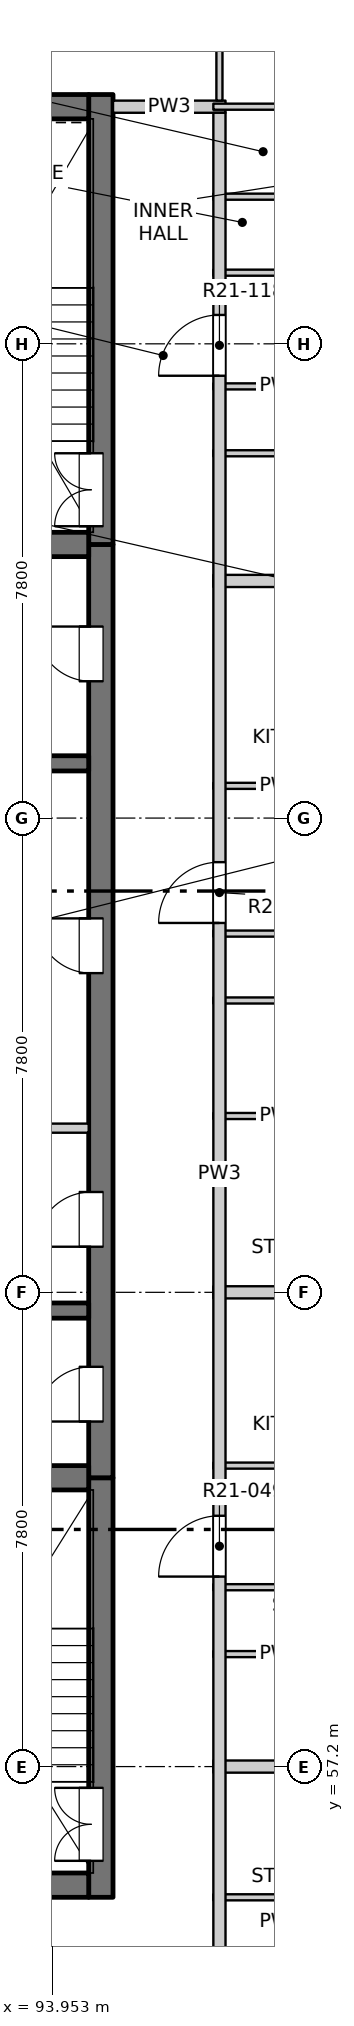
"""IFC4 building model, lengths in metres.
Left out: names, types, materials, properties, quantities, classifications, styles, units other than length and angle.
Written with IfcOpenShell. Run it as: python <this file> out.ifc"""

import sys

from ifc_helpers import new_model, si_unit, direction, frame, frame_2d, origin, place, context, subcontext, project, spatial, rectangle, extrude, element, fill, save


model = new_model("IFC4")
c1 = context("Model", 3, precision=1e-05, world=origin(), true_north=direction((0.0, 1.0)))
c2 = subcontext(c1, "Body", "Model", "MODEL_VIEW")
j1 = project(units=[si_unit("LENGTHUNIT", "METRE"), si_unit("PLANEANGLEUNIT", "RADIAN")], contexts=[c1])
p1 = place(None, origin())
s1 = spatial("IfcSite", under=j1, at=p1, CompositionType="ELEMENT")
p2 = place(p1, origin())
s2 = spatial("IfcBuilding", under=s1, at=p2, CompositionType="ELEMENT")
p3 = place(p2, frame((0.0, 0.0, 221.1)))
s3 = spatial("IfcBuildingStorey", under=s2, at=p3, CompositionType="ELEMENT", Elevation=221.1)
p4 = place(p3, frame((94.75, 55.05, -0.25), z_axis=(0.0, 0.0, 1.0), x_axis=(0.0, 1.0, 0.0)))
e1 = element("IfcWall", 1, at=p4, inside=s3, PredefinedType="SOLIDWALL", context=c2, shape_type="SweptSolid", body=[
    extrude(rectangle(XDim=6.9, YDim=0.4, at=frame_2d((3.45, 0.0))), origin(), (0.0, 0.0, 1.0), 3.4),
])
p5 = place(p4, frame((0.6, 0.0, 0.25)))
e2 = element("IfcOpeningElement", 2, at=p5, cuts=e1, PredefinedType="OPENING", context=c2, shape_type="SweptSolid", body=[
    extrude(rectangle(XDim=1.2, YDim=2.1, at=frame_2d((0.6, 1.05))), frame((0.0, 0.21, 0.0), z_axis=(0.0, -1.0, 0.0), x_axis=(1.0, 0.0, 0.0)), (0.0, 0.0, 1.0), 0.42),
])
p6 = place(p3, frame((94.75, 61.95, -0.25), z_axis=(0.0, 0.0, 1.0), x_axis=(0.0, 1.0, 0.0)))
e3 = element("IfcWall", 3, at=p6, inside=s3, PredefinedType="SOLIDWALL", context=c2, shape_type="SweptSolid", body=[
    extrude(rectangle(XDim=15.35, YDim=0.4, at=frame_2d((7.675, 0.0))), origin(), (0.0, 0.0, 1.0), 3.4),
])
p7 = place(p6, frame((0.925, 0.0, 0.25)))
e4 = element("IfcOpeningElement", 4, at=p7, cuts=e3, PredefinedType="OPENING", context=c2, shape_type="SweptSolid", body=[
    extrude(rectangle(XDim=0.9, YDim=2.1, at=frame_2d((0.45, 1.05))), frame((0.0, 0.21, 0.0), z_axis=(0.0, -1.0, 0.0), x_axis=(1.0, 0.0, 0.0)), (0.0, 0.0, 1.0), 0.42),
])
p8 = place(p6, frame((3.8, 0.0, 0.25)))
e5 = element("IfcOpeningElement", 5, at=p8, cuts=e3, PredefinedType="OPENING", context=c2, shape_type="SweptSolid", body=[
    extrude(rectangle(XDim=0.9, YDim=2.1, at=frame_2d((0.45, 1.05))), frame((0.0, 0.21, 0.0), z_axis=(0.0, -1.0, 0.0), x_axis=(1.0, 0.0, 0.0)), (0.0, 0.0, 1.0), 0.42),
])
p9 = place(p6, frame((8.3, 0.0, 0.25)))
e6 = element("IfcOpeningElement", 6, at=p9, cuts=e3, PredefinedType="OPENING", context=c2, shape_type="SweptSolid", body=[
    extrude(rectangle(XDim=0.9, YDim=2.1, at=frame_2d((0.45, 1.05))), frame((0.0, 0.21, 0.0), z_axis=(0.0, -1.0, 0.0), x_axis=(1.0, 0.0, 0.0)), (0.0, 0.0, 1.0), 0.42),
])
p10 = place(p6, frame((13.1, 0.0, 0.25)))
e7 = element("IfcOpeningElement", 7, at=p10, cuts=e3, PredefinedType="OPENING", context=c2, shape_type="SweptSolid", body=[
    extrude(rectangle(XDim=0.9, YDim=2.1, at=frame_2d((0.45, 1.05))), frame((0.0, 0.21, 0.0), z_axis=(0.0, -1.0, 0.0), x_axis=(1.0, 0.0, 0.0)), (0.0, 0.0, 1.0), 0.42),
])
p11 = place(p3, frame((94.75, 77.3, -0.25), z_axis=(0.0, 0.0, 1.0), x_axis=(0.0, 1.0, 0.0)))
e8 = element("IfcWall", 8, at=p11, inside=s3, PredefinedType="SOLIDWALL", context=c2, shape_type="SweptSolid", body=[
    extrude(rectangle(XDim=7.4, YDim=0.4, at=frame_2d((3.7, 0.0))), origin(), (0.0, 0.0, 1.0), 3.4),
])
p12 = place(p11, frame((0.3, 0.0, 0.25)))
e9 = element("IfcOpeningElement", 9, at=p12, cuts=e8, PredefinedType="OPENING", context=c2, shape_type="SweptSolid", body=[
    extrude(rectangle(XDim=1.2, YDim=2.1, at=frame_2d((0.6, 1.05))), frame((0.0, 0.21, 0.0), z_axis=(0.0, -1.0, 0.0), x_axis=(1.0, 0.0, 0.0)), (0.0, 0.0, 1.0), 0.42),
])
p13 = place(p3, frame((75.45, 55.25, -0.25), z_axis=(0.0, 0.0, 1.0), x_axis=(1.0, 0.0, 0.0)))
e10 = element("IfcWall", 10, at=p13, inside=s3, PredefinedType="SOLIDWALL", context=c2, shape_type="SweptSolid", body=[
    extrude(rectangle(XDim=19.1, YDim=0.4, at=frame_2d((9.55, 0.0))), origin(), (0.0, 0.0, 1.0), 3.4),
])
p14 = place(p13, frame((8.8, 0.0, 0.25)))
e11 = element("IfcOpeningElement", 11, at=p14, cuts=e10, PredefinedType="OPENING", context=c2, shape_type="SweptSolid", body=[
    extrude(rectangle(XDim=1.5, YDim=2.1, at=frame_2d((0.75, 1.05))), frame((0.0, 0.21, 0.0), z_axis=(0.0, -1.0, 0.0), x_axis=(1.0, 0.0, 0.0)), (0.0, 0.0, 1.0), 0.42),
])
p15 = place(p3, frame((75.45, 84.5, -0.25), z_axis=(0.0, 0.0, 1.0), x_axis=(1.0, 0.0, 0.0)))
e12 = element("IfcWall", 12, at=p15, inside=s3, PredefinedType="SOLIDWALL", context=c2, shape_type="SweptSolid", body=[
    extrude(rectangle(XDim=19.1, YDim=0.4, at=frame_2d((9.55, 0.0))), origin(), (0.0, 0.0, 1.0), 3.4),
])
p16 = place(p3, frame((90.675, 61.95, -0.25), z_axis=(0.0, 0.0, 1.0), x_axis=(1.0, 0.0, 0.0)))
e13 = element("IfcWall", 13, at=p16, inside=s3, PredefinedType="SOLIDWALL", context=c2, shape_type="SweptSolid", body=[
    extrude(rectangle(XDim=3.875, YDim=0.4, at=frame_2d((1.938, 0.0))), origin(), (0.0, 0.0, 1.0), 3.4),
])
for number, where, z_axis, x_axis in (
    (14, (90.675, 64.7, -0.25), (0.0, 0.0, 1.0), (1.0, 0.0, 0.0)),
    (15, (90.675, 73.7, -0.25), (0.0, 0.0, 1.0), (1.0, 0.0, 0.0)),
):
    element("IfcWall", number, at=place(p3, frame(where, z_axis=z_axis, x_axis=x_axis)), inside=s3, PredefinedType="SOLIDWALL", context=c2, shape_type="SweptSolid", body=[
        extrude(rectangle(XDim=3.875, YDim=0.25, at=frame_2d((1.938, 0.0))), origin(), (0.0, 0.0, 1.0), 3.4),
    ])
p17 = place(p3, frame((90.675, 77.3, -0.25), z_axis=(0.0, 0.0, 1.0), x_axis=(1.0, 0.0, 0.0)))
e16 = element("IfcWall", 16, at=p17, inside=s3, PredefinedType="SOLIDWALL", context=c2, shape_type="SweptSolid", body=[
    extrude(rectangle(XDim=3.875, YDim=0.4, at=frame_2d((1.938, 0.0))), origin(), (0.0, 0.0, 1.0), 3.4),
])
p18 = place(p3, frame((96.6, 55.05, 0.0), z_axis=(0.0, 0.0, 1.0), x_axis=(1.0, 0.0, 0.0)))
e17 = element("IfcWall", 17, at=p18, inside=s3, PredefinedType="PARTITIONING", context=c2, shape_type="SweptSolid", body=[
    extrude(rectangle(XDim=2.22, YDim=0.1, at=frame_2d((1.11, 0.0))), origin(), (0.0, 0.0, 1.0), 3.15),
])
p19 = place(p3, frame((96.6, 57.2, 0.0), z_axis=(0.0, 0.0, 1.0), x_axis=(1.0, 0.0, 0.0)))
e18 = element("IfcWall", 18, at=p19, inside=s3, PredefinedType="PARTITIONING", context=c2, shape_type="SweptSolid", body=[
    extrude(rectangle(XDim=11.5, YDim=0.2, at=frame_2d((5.75, 0.0))), origin(), (0.0, 0.0, 1.0), 3.15),
])
for number, where, z_axis, x_axis in (
    (19, (96.6, 59.05, 0.0), (0.0, 0.0, 1.0), (1.0, 0.0, 0.0)),
    (20, (96.6, 60.15, 0.0), (0.0, 0.0, 1.0), (1.0, 0.0, 0.0)),
    (21, (96.6, 62.15, 0.0), (0.0, 0.0, 1.0), (1.0, 0.0, 0.0)),
):
    element("IfcWall", number, at=place(p3, frame(where, z_axis=z_axis, x_axis=x_axis)), inside=s3, PredefinedType="PARTITIONING", context=c2, shape_type="SweptSolid", body=[
        extrude(rectangle(XDim=2.22, YDim=0.1, at=frame_2d((1.11, 0.0))), origin(), (0.0, 0.0, 1.0), 3.15),
    ])
p20 = place(p3, frame((96.6, 65.0, 0.0), z_axis=(0.0, 0.0, 1.0), x_axis=(1.0, 0.0, 0.0)))
e22 = element("IfcWall", 22, at=p20, inside=s3, PredefinedType="PARTITIONING", context=c2, shape_type="SweptSolid", body=[
    extrude(rectangle(XDim=11.5, YDim=0.2, at=frame_2d((5.75, 0.0))), origin(), (0.0, 0.0, 1.0), 3.15),
])
p21 = place(p3, frame((90.675, 67.7, 0.0), z_axis=(0.0, 0.0, 1.0), x_axis=(1.0, 0.0, 0.0)))
e23 = element("IfcWall", 23, at=p21, inside=s3, PredefinedType="PARTITIONING", context=c2, shape_type="SweptSolid", body=[
    extrude(rectangle(XDim=3.875, YDim=0.15, at=frame_2d((1.938, 0.0))), origin(), (0.0, 0.0, 1.0), 3.15),
])
for number, where, z_axis, x_axis in (
    (24, (96.6, 67.9, 0.0), (0.0, 0.0, 1.0), (1.0, 0.0, 0.0)),
    (25, (96.6, 69.8, 0.0), (0.0, 0.0, 1.0), (1.0, 0.0, 0.0)),
    (26, (96.6, 70.9, 0.0), (0.0, 0.0, 1.0), (1.0, 0.0, 0.0)),
    (27, (96.6, 73.33, 0.0), (0.0, 0.0, 1.0), (1.0, 0.0, 0.0)),
):
    element("IfcWall", number, at=place(p3, frame(where, z_axis=z_axis, x_axis=x_axis)), inside=s3, PredefinedType="PARTITIONING", context=c2, shape_type="SweptSolid", body=[
        extrude(rectangle(XDim=2.22, YDim=0.1, at=frame_2d((1.11, 0.0))), origin(), (0.0, 0.0, 1.0), 3.15),
    ])
p22 = place(p3, frame((96.6, 76.7, 0.0), z_axis=(0.0, 0.0, 1.0), x_axis=(1.0, 0.0, 0.0)))
e28 = element("IfcWall", 28, at=p22, inside=s3, PredefinedType="PARTITIONING", context=c2, shape_type="SweptSolid", body=[
    extrude(rectangle(XDim=11.5, YDim=0.2, at=frame_2d((5.75, 0.0))), origin(), (0.0, 0.0, 1.0), 2.55),
])
for number, where, z_axis, x_axis in (
    (29, (96.6, 78.8, 0.0), (0.0, 0.0, 1.0), (1.0, 0.0, 0.0)),
    (30, (96.6, 79.9, 0.0), (0.0, 0.0, 1.0), (1.0, 0.0, 0.0)),
    (31, (96.6, 81.77, 0.0), (0.0, 0.0, 1.0), (1.0, 0.0, 0.0)),
    (32, (96.6, 83.02, 0.0), (0.0, 0.0, 1.0), (1.0, 0.0, 0.0)),
):
    element("IfcWall", number, at=place(p3, frame(where, z_axis=z_axis, x_axis=x_axis)), inside=s3, PredefinedType="PARTITIONING", context=c2, shape_type="SweptSolid", body=[
        extrude(rectangle(XDim=2.22, YDim=0.1, at=frame_2d((1.11, 0.0))), origin(), (0.0, 0.0, 1.0), 3.15),
    ])
p23 = place(p3, frame((94.95, 84.5, 0.0), z_axis=(0.0, 0.0, 1.0), x_axis=(1.0, 0.0, 0.0)))
e33 = element("IfcWall", 33, at=p23, inside=s3, PredefinedType="PARTITIONING", context=c2, shape_type="SweptSolid", body=[
    extrude(rectangle(XDim=1.85, YDim=0.2, at=frame_2d((0.925, 0.0))), origin(), (0.0, 0.0, 1.0), 3.15),
])
p24 = place(p3, frame((96.6, 84.5, 0.0), z_axis=(0.0, 0.0, 1.0), x_axis=(1.0, 0.0, 0.0)))
e34 = element("IfcWall", 34, at=p24, inside=s3, PredefinedType="PARTITIONING", context=c2, shape_type="SweptSolid", body=[
    extrude(rectangle(XDim=11.5, YDim=0.1, at=frame_2d((5.75, 0.0))), origin(), (0.0, 0.0, 1.0), 3.15),
])
p25 = place(p24, frame((2.635, 0.0, 0.0)))
e35 = element("IfcOpeningElement", 35, at=p25, cuts=e34, PredefinedType="OPENING", context=c2, shape_type="SweptSolid", body=[
    extrude(rectangle(XDim=0.9, YDim=2.1, at=frame_2d((0.45, 1.05))), frame((0.0, 0.06, 0.0), z_axis=(0.0, -1.0, 0.0), x_axis=(1.0, 0.0, 0.0)), (0.0, 0.0, 1.0), 0.12),
])
p26 = place(p3, frame((96.7, 49.5, 0.0), z_axis=(0.0, 0.0, 1.0), x_axis=(0.0, 1.0, 0.0)))
e36 = element("IfcWall", 36, at=p26, inside=s3, PredefinedType="PARTITIONING", context=c2, shape_type="SweptSolid", body=[
    extrude(rectangle(XDim=34.9, YDim=0.2, at=frame_2d((17.45, 0.0))), origin(), (0.0, 0.0, 1.0), 3.15),
])
p27 = place(p26, frame((3.275, 0.0, 0.0)))
e37 = element("IfcOpeningElement", 37, at=p27, cuts=e36, PredefinedType="OPENING", context=c2, shape_type="SweptSolid", body=[
    extrude(rectangle(XDim=1.0, YDim=2.1, at=frame_2d((0.5, 1.05))), frame((0.0, 0.11, 0.0), z_axis=(0.0, -1.0, 0.0), x_axis=(1.0, 0.0, 0.0)), (0.0, 0.0, 1.0), 0.22),
])
p28 = place(p26, frame((10.825, 0.0, 0.0)))
e38 = element("IfcOpeningElement", 38, at=p28, cuts=e36, PredefinedType="OPENING", context=c2, shape_type="SweptSolid", body=[
    extrude(rectangle(XDim=1.0, YDim=2.1, at=frame_2d((0.5, 1.05))), frame((0.0, 0.11, 0.0), z_axis=(0.0, -1.0, 0.0), x_axis=(1.0, 0.0, 0.0)), (0.0, 0.0, 1.0), 0.22),
])
p29 = place(p26, frame((21.575, 0.0, 0.0)))
e39 = element("IfcOpeningElement", 39, at=p29, cuts=e36, PredefinedType="OPENING", context=c2, shape_type="SweptSolid", body=[
    extrude(rectangle(XDim=1.0, YDim=2.1, at=frame_2d((0.5, 1.05))), frame((0.0, 0.11, 0.0), z_axis=(0.0, -1.0, 0.0), x_axis=(1.0, 0.0, 0.0)), (0.0, 0.0, 1.0), 0.22),
])
p30 = place(p26, frame((30.575, 0.0, 0.0)))
e40 = element("IfcOpeningElement", 40, at=p30, cuts=e36, PredefinedType="OPENING", context=c2, shape_type="SweptSolid", body=[
    extrude(rectangle(XDim=1.0, YDim=2.1, at=frame_2d((0.5, 1.05))), frame((0.0, 0.11, 0.0), z_axis=(0.0, -1.0, 0.0), x_axis=(1.0, 0.0, 0.0)), (0.0, 0.0, 1.0), 0.22),
])
p31 = place(p3, frame((96.7, 84.6, 0.0), z_axis=(0.0, 0.0, 1.0), x_axis=(0.0, 1.0, 0.0)))
e41 = element("IfcWall", 41, at=p31, inside=s3, PredefinedType="PARTITIONING", context=c2, shape_type="SweptSolid", body=[
    extrude(rectangle(XDim=3.5, YDim=0.1, at=frame_2d((1.75, 0.0))), origin(), (0.0, 0.0, 1.0), 3.15),
])
p32 = place(p31, frame((1.4, 0.0, 0.0)))
e42 = element("IfcOpeningElement", 42, at=p32, cuts=e41, PredefinedType="OPENING", context=c2, shape_type="SweptSolid", body=[
    extrude(rectangle(XDim=0.9, YDim=2.1, at=frame_2d((0.45, 1.05))), frame((0.0, 0.06, 0.0), z_axis=(0.0, -1.0, 0.0), x_axis=(1.0, 0.0, 0.0)), (0.0, 0.0, 1.0), 0.12),
])
p33 = place(p5, origin())
e43 = element("IfcDoor", 43, at=p33, inside=s3, OperationType="DOUBLE_DOOR_SINGLE_SWING", PredefinedType="DOOR", context=c2, shape_type="SweptSolid", body=[
    extrude(rectangle(XDim=1.2, YDim=2.1, at=frame_2d((0.6, 1.05))), frame((0.0, 0.185, 0.0), z_axis=(0.0, -1.0, 0.0), x_axis=(1.0, 0.0, 0.0)), (0.0, 0.0, 1.0), 0.05),
])
fill(e2, e43)
p34 = place(p28, origin())
e44 = element("IfcDoor", 44, at=p34, inside=s3, OperationType="SINGLE_SWING_LEFT", PredefinedType="DOOR", context=c2, shape_type="SweptSolid", body=[
    extrude(rectangle(XDim=1.0, YDim=2.1, at=frame_2d((0.5, 1.05))), frame((0.0, 0.025, 0.0), z_axis=(0.0, -1.0, 0.0), x_axis=(1.0, 0.0, 0.0)), (0.0, 0.0, 1.0), 0.05),
])
fill(e38, e44)
p35 = place(p7, origin())
e45 = element("IfcDoor", 45, at=p35, inside=s3, OperationType="SINGLE_SWING_LEFT", PredefinedType="DOOR", context=c2, shape_type="SweptSolid", body=[
    extrude(rectangle(XDim=0.9, YDim=2.1, at=frame_2d((0.45, 1.05))), frame((0.0, 0.185, 0.0), z_axis=(0.0, -1.0, 0.0), x_axis=(1.0, 0.0, 0.0)), (0.0, 0.0, 1.0), 0.05),
])
fill(e4, e45)
p36 = place(p8, origin())
e46 = element("IfcDoor", 46, at=p36, inside=s3, OperationType="SINGLE_SWING_LEFT", PredefinedType="DOOR", context=c2, shape_type="SweptSolid", body=[
    extrude(rectangle(XDim=0.9, YDim=2.1, at=frame_2d((0.45, 1.05))), frame((0.0, 0.185, 0.0), z_axis=(0.0, -1.0, 0.0), x_axis=(1.0, 0.0, 0.0)), (0.0, 0.0, 1.0), 0.05),
])
fill(e5, e46)
p37 = place(p9, origin())
e47 = element("IfcDoor", 47, at=p37, inside=s3, OperationType="SINGLE_SWING_RIGHT", PredefinedType="DOOR", context=c2, shape_type="SweptSolid", body=[
    extrude(rectangle(XDim=0.9, YDim=2.1, at=frame_2d((0.45, 1.05))), frame((0.0, 0.185, 0.0), z_axis=(0.0, -1.0, 0.0), x_axis=(1.0, 0.0, 0.0)), (0.0, 0.0, 1.0), 0.05),
])
fill(e6, e47)
p38 = place(p29, origin())
e48 = element("IfcDoor", 48, at=p38, inside=s3, OperationType="SINGLE_SWING_LEFT", PredefinedType="DOOR", context=c2, shape_type="SweptSolid", body=[
    extrude(rectangle(XDim=1.0, YDim=2.1, at=frame_2d((0.5, 1.05))), frame((0.0, 0.025, 0.0), z_axis=(0.0, -1.0, 0.0), x_axis=(1.0, 0.0, 0.0)), (0.0, 0.0, 1.0), 0.05),
])
fill(e39, e48)
p39 = place(p10, origin())
e49 = element("IfcDoor", 49, at=p39, inside=s3, OperationType="SINGLE_SWING_RIGHT", PredefinedType="DOOR", context=c2, shape_type="SweptSolid", body=[
    extrude(rectangle(XDim=0.9, YDim=2.1, at=frame_2d((0.45, 1.05))), frame((0.0, 0.185, 0.0), z_axis=(0.0, -1.0, 0.0), x_axis=(1.0, 0.0, 0.0)), (0.0, 0.0, 1.0), 0.05),
])
fill(e7, e49)
p40 = place(p12, origin())
e50 = element("IfcDoor", 50, at=p40, inside=s3, OperationType="DOUBLE_DOOR_SINGLE_SWING", PredefinedType="DOOR", context=c2, shape_type="SweptSolid", body=[
    extrude(rectangle(XDim=1.2, YDim=2.1, at=frame_2d((0.6, 1.05))), frame((0.0, 0.185, 0.0), z_axis=(0.0, -1.0, 0.0), x_axis=(1.0, 0.0, 0.0)), (0.0, 0.0, 1.0), 0.05),
])
fill(e9, e50)
p41 = place(p30, origin())
e51 = element("IfcDoor", 51, at=p41, inside=s3, OperationType="SINGLE_SWING_LEFT", PredefinedType="DOOR", context=c2, shape_type="SweptSolid", body=[
    extrude(rectangle(XDim=1.0, YDim=2.1, at=frame_2d((0.5, 1.05))), frame((0.0, 0.025, 0.0), z_axis=(0.0, -1.0, 0.0), x_axis=(1.0, 0.0, 0.0)), (0.0, 0.0, 1.0), 0.05),
])
fill(e40, e51)
save(model, sys.argv[1])
